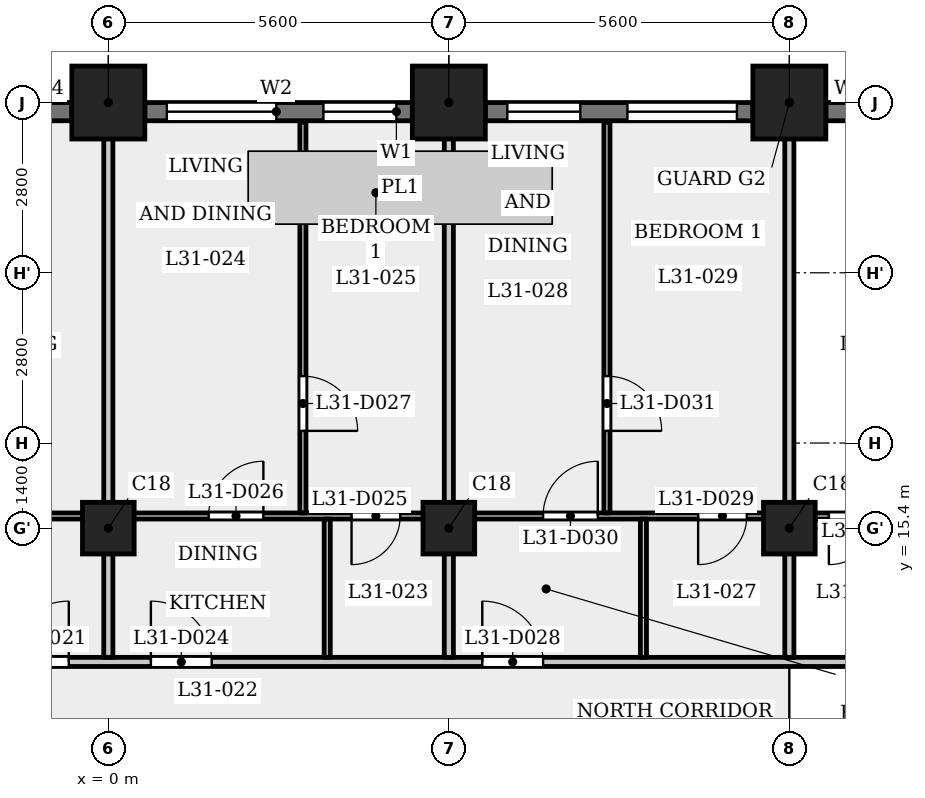
"""IFC4 building model, lengths in metres.
Left out: names, types, materials, properties, quantities, classifications, styles, units other than length and angle.
Written with IfcOpenShell. Run it as: python <this file> out.ifc"""

import sys

from ifc_helpers import new_model, si_unit, direction, frame, frame_2d, origin, origin_2d, place, context, subcontext, project, spatial, rectangle, extrude, element, fill, save


model = new_model("IFC4")
c1 = context("Model", 3, precision=1e-05, world=origin(), true_north=direction((0.0, 1.0)))
c2 = subcontext(c1, "Body", "Model", "MODEL_VIEW")
j1 = project(units=[si_unit("LENGTHUNIT", "METRE"), si_unit("PLANEANGLEUNIT", "RADIAN")], contexts=[c1])
p1 = place(None, origin())
s1 = spatial("IfcSite", under=j1, at=p1, CompositionType="ELEMENT")
p2 = place(p1, origin())
s2 = spatial("IfcBuilding", under=s1, at=p2, CompositionType="ELEMENT")
p3 = place(p2, frame((0.0, 0.0, 121.8)))
s3 = spatial("IfcBuildingStorey", under=s2, at=p3, CompositionType="ELEMENT", Elevation=121.8)
for number, where, z_axis, x_axis in (
    (1, (11.2, 22.4, 0.0), (0.0, 0.0, 1.0), (1.0, 0.0, 0.0)),
    (2, (5.6, 22.4, 0.0), (0.0, 0.0, 1.0), (1.0, 0.0, 0.0)),
    (3, (0.0, 22.4, 0.0), (0.0, 0.0, 1.0), (1.0, 0.0, 0.0)),
):
    element("IfcColumn", number, at=place(p3, frame(where, z_axis=z_axis, x_axis=x_axis)), inside=s3, PredefinedType="COLUMN", context=c2, shape_type="SweptSolid", body=[
        extrude(rectangle(XDim=1.2, YDim=1.2, at=origin_2d()), origin(), (0.0, 0.0, 1.0), 3.5),
    ])
for number, where, z_axis, x_axis in (
    (4, (0.0, 15.4, 0.0), (0.0, 0.0, 1.0), (1.0, 0.0, 0.0)),
    (5, (5.6, 15.4, 0.0), (0.0, 0.0, 1.0), (1.0, 0.0, 0.0)),
    (6, (11.2, 15.4, 0.0), (0.0, 0.0, 1.0), (1.0, 0.0, 0.0)),
):
    element("IfcColumn", number, at=place(p3, frame(where, z_axis=z_axis, x_axis=x_axis)), inside=s3, PredefinedType="COLUMN", context=c2, shape_type="SweptSolid", body=[
        extrude(rectangle(XDim=0.85, YDim=0.85, at=origin_2d()), origin(), (0.0, 0.0, 1.0), 3.5),
    ])
p4 = place(p3, frame((16.2, 22.25, 0.0), z_axis=(0.0, 0.0, 1.0), x_axis=(-1.0, 0.0, 0.0)))
e7 = element("IfcWall", 7, at=p4, inside=s3, PredefinedType="SOLIDWALL", context=c2, shape_type="SweptSolid", body=[
    extrude(rectangle(XDim=4.4, YDim=0.3, at=frame_2d((2.2, 0.0))), origin(), (0.0, 0.0, 1.0), 2.35),
])
p5 = place(p4, frame((0.4, 0.0, 1.2)))
e8 = element("IfcOpeningElement", 8, at=p5, cuts=e7, PredefinedType="OPENING", context=c2, shape_type="SweptSolid", body=[
    extrude(rectangle(XDim=3.6, YDim=0.95, at=frame_2d((1.8, 0.475))), frame((0.0, 0.16, 0.0), z_axis=(0.0, -1.0, 0.0), x_axis=(1.0, 0.0, 0.0)), (0.0, 0.0, 1.0), 0.32),
])
p6 = place(p3, frame((10.6, 22.25, 0.0), z_axis=(0.0, 0.0, 1.0), x_axis=(-1.0, 0.0, 0.0)))
e9 = element("IfcWall", 9, at=p6, inside=s3, PredefinedType="SOLIDWALL", context=c2, shape_type="SweptSolid", body=[
    extrude(rectangle(XDim=4.4, YDim=0.3, at=frame_2d((2.2, 0.0))), origin(), (0.0, 0.0, 1.0), 2.35),
])
p7 = place(p6, frame((0.262, 0.0, 0.9)))
e10 = element("IfcOpeningElement", 10, at=p7, cuts=e9, PredefinedType="OPENING", context=c2, shape_type="SweptSolid", body=[
    extrude(rectangle(XDim=1.8, YDim=1.25, at=frame_2d((0.9, 0.625))), frame((0.0, 0.16, 0.0), z_axis=(0.0, -1.0, 0.0), x_axis=(1.0, 0.0, 0.0)), (0.0, 0.0, 1.0), 0.32),
])
p8 = place(p6, frame((2.837, 0.0, 0.6)))
e11 = element("IfcOpeningElement", 11, at=p8, cuts=e9, PredefinedType="OPENING", context=c2, shape_type="SweptSolid", body=[
    extrude(rectangle(XDim=1.2, YDim=1.55, at=frame_2d((0.6, 0.775))), frame((0.0, 0.16, 0.0), z_axis=(0.0, -1.0, 0.0), x_axis=(1.0, 0.0, 0.0)), (0.0, 0.0, 1.0), 0.32),
])
p9 = place(p3, frame((5.0, 22.25, 0.0), z_axis=(0.0, 0.0, 1.0), x_axis=(-1.0, 0.0, 0.0)))
e12 = element("IfcWall", 12, at=p9, inside=s3, PredefinedType="SOLIDWALL", context=c2, shape_type="SweptSolid", body=[
    extrude(rectangle(XDim=4.4, YDim=0.3, at=frame_2d((2.2, 0.0))), origin(), (0.0, 0.0, 1.0), 2.35),
])
p10 = place(p9, frame((0.262, 0.0, 0.6)))
e13 = element("IfcOpeningElement", 13, at=p10, cuts=e12, PredefinedType="OPENING", context=c2, shape_type="SweptSolid", body=[
    extrude(rectangle(XDim=1.2, YDim=1.55, at=frame_2d((0.6, 0.775))), frame((0.0, 0.16, 0.0), z_axis=(0.0, -1.0, 0.0), x_axis=(1.0, 0.0, 0.0)), (0.0, 0.0, 1.0), 0.32),
])
p11 = place(p9, frame((2.238, 0.0, 0.9)))
e14 = element("IfcOpeningElement", 14, at=p11, cuts=e12, PredefinedType="OPENING", context=c2, shape_type="SweptSolid", body=[
    extrude(rectangle(XDim=1.8, YDim=1.25, at=frame_2d((0.9, 0.625))), frame((0.0, 0.16, 0.0), z_axis=(0.0, -1.0, 0.0), x_axis=(1.0, 0.0, 0.0)), (0.0, 0.0, 1.0), 0.32),
])
p12 = place(p3, frame((-0.6, 22.25, 0.0), z_axis=(0.0, 0.0, 1.0), x_axis=(-1.0, 0.0, 0.0)))
e15 = element("IfcWall", 15, at=p12, inside=s3, PredefinedType="SOLIDWALL", context=c2, shape_type="SweptSolid", body=[
    extrude(rectangle(XDim=4.4, YDim=0.3, at=frame_2d((2.2, 0.0))), origin(), (0.0, 0.0, 1.0), 2.35),
])
p13 = place(p12, frame((0.4, 0.0, 1.2)))
e16 = element("IfcOpeningElement", 16, at=p13, cuts=e15, PredefinedType="OPENING", context=c2, shape_type="SweptSolid", body=[
    extrude(rectangle(XDim=3.6, YDim=0.95, at=frame_2d((1.8, 0.475))), frame((0.0, 0.16, 0.0), z_axis=(0.0, -1.0, 0.0), x_axis=(1.0, 0.0, 0.0)), (0.0, 0.0, 1.0), 0.32),
])
p14 = place(p3, frame((-17.4, 13.2, 0.0), z_axis=(0.0, 0.0, 1.0), x_axis=(1.0, 0.0, 0.0)))
e17 = element("IfcWall", 17, at=p14, inside=s3, PredefinedType="PARTITIONING", context=c2, shape_type="SweptSolid", body=[
    extrude(rectangle(XDim=34.8, YDim=0.15, at=frame_2d((17.4, 0.0))), origin(), (0.0, 0.0, 1.0), 3.15),
])
p15 = place(p14, frame((0.25, 0.0, 0.0)))
e18 = element("IfcOpeningElement", 18, at=p15, cuts=e17, PredefinedType="OPENING", context=c2, shape_type="SweptSolid", body=[
    extrude(rectangle(XDim=1.0, YDim=2.1, at=frame_2d((0.5, 1.05))), frame((0.0, 0.085, 0.0), z_axis=(0.0, -1.0, 0.0), x_axis=(1.0, 0.0, 0.0)), (0.0, 0.0, 1.0), 0.17),
])
p16 = place(p14, frame((33.65, 0.0, 0.0)))
e19 = element("IfcOpeningElement", 19, at=p16, cuts=e17, PredefinedType="OPENING", context=c2, shape_type="SweptSolid", body=[
    extrude(rectangle(XDim=1.0, YDim=2.1, at=frame_2d((0.5, 1.05))), frame((0.0, 0.085, 0.0), z_axis=(0.0, -1.0, 0.0), x_axis=(1.0, 0.0, 0.0)), (0.0, 0.0, 1.0), 0.17),
])
p17 = place(p14, frame((15.75, 0.0, 0.0)))
e20 = element("IfcOpeningElement", 20, at=p17, cuts=e17, PredefinedType="OPENING", context=c2, shape_type="SweptSolid", body=[
    extrude(rectangle(XDim=1.0, YDim=2.1, at=frame_2d((0.5, 1.05))), frame((0.0, 0.085, 0.0), z_axis=(0.0, -1.0, 0.0), x_axis=(1.0, 0.0, 0.0)), (0.0, 0.0, 1.0), 0.17),
])
p18 = place(p14, frame((18.1, 0.0, 0.0)))
e21 = element("IfcOpeningElement", 21, at=p18, cuts=e17, PredefinedType="OPENING", context=c2, shape_type="SweptSolid", body=[
    extrude(rectangle(XDim=1.0, YDim=2.1, at=frame_2d((0.5, 1.05))), frame((0.0, 0.085, 0.0), z_axis=(0.0, -1.0, 0.0), x_axis=(1.0, 0.0, 0.0)), (0.0, 0.0, 1.0), 0.17),
])
p19 = place(p14, frame((23.55, 0.0, 0.0)))
e22 = element("IfcOpeningElement", 22, at=p19, cuts=e17, PredefinedType="OPENING", context=c2, shape_type="SweptSolid", body=[
    extrude(rectangle(XDim=1.0, YDim=2.1, at=frame_2d((0.5, 1.05))), frame((0.0, 0.085, 0.0), z_axis=(0.0, -1.0, 0.0), x_axis=(1.0, 0.0, 0.0)), (0.0, 0.0, 1.0), 0.17),
])
p20 = place(p3, frame((-16.725, 15.6, 0.0), z_axis=(0.0, 0.0, 1.0), x_axis=(1.0, 0.0, 0.0)))
e23 = element("IfcWall", 23, at=p20, inside=s3, PredefinedType="PARTITIONING", context=c2, shape_type="SweptSolid", body=[
    extrude(rectangle(XDim=33.45, YDim=0.1, at=frame_2d((16.725, 0.0))), origin(), (0.0, 0.0, 1.0), 3.15),
])
p21 = place(p20, frame((9.425, 0.0, 0.0)))
e24 = element("IfcOpeningElement", 24, at=p21, cuts=e23, PredefinedType="OPENING", context=c2, shape_type="SweptSolid", body=[
    extrude(rectangle(XDim=0.8, YDim=2.1, at=frame_2d((0.4, 1.05))), frame((0.0, 0.06, 0.0), z_axis=(0.0, -1.0, 0.0), x_axis=(1.0, 0.0, 0.0)), (0.0, 0.0, 1.0), 0.12),
])
p22 = place(p20, frame((6.975, 0.0, 0.0)))
e25 = element("IfcOpeningElement", 25, at=p22, cuts=e23, PredefinedType="OPENING", context=c2, shape_type="SweptSolid", body=[
    extrude(rectangle(XDim=0.9, YDim=2.1, at=frame_2d((0.45, 1.05))), frame((0.0, 0.06, 0.0), z_axis=(0.0, -1.0, 0.0), x_axis=(1.0, 0.0, 0.0)), (0.0, 0.0, 1.0), 0.12),
])
p23 = place(p20, frame((1.875, 0.0, 0.0)))
e26 = element("IfcOpeningElement", 26, at=p23, cuts=e23, PredefinedType="OPENING", context=c2, shape_type="SweptSolid", body=[
    extrude(rectangle(XDim=0.9, YDim=2.1, at=frame_2d((0.45, 1.05))), frame((0.0, 0.06, 0.0), z_axis=(0.0, -1.0, 0.0), x_axis=(1.0, 0.0, 0.0)), (0.0, 0.0, 1.0), 0.12),
])
p24 = place(p20, frame((3.475, 0.0, 0.0)))
e27 = element("IfcOpeningElement", 27, at=p24, cuts=e23, PredefinedType="OPENING", context=c2, shape_type="SweptSolid", body=[
    extrude(rectangle(XDim=0.9, YDim=2.1, at=frame_2d((0.45, 1.05))), frame((0.0, 0.06, 0.0), z_axis=(0.0, -1.0, 0.0), x_axis=(1.0, 0.0, 0.0)), (0.0, 0.0, 1.0), 0.12),
])
p25 = place(p20, frame((11.775, 0.0, 0.0)))
e28 = element("IfcOpeningElement", 28, at=p25, cuts=e23, PredefinedType="OPENING", context=c2, shape_type="SweptSolid", body=[
    extrude(rectangle(XDim=0.8, YDim=2.1, at=frame_2d((0.4, 1.05))), frame((0.0, 0.06, 0.0), z_axis=(0.0, -1.0, 0.0), x_axis=(1.0, 0.0, 0.0)), (0.0, 0.0, 1.0), 0.12),
])
p26 = place(p20, frame((14.175, 0.0, 0.0)))
e29 = element("IfcOpeningElement", 29, at=p26, cuts=e23, PredefinedType="OPENING", context=c2, shape_type="SweptSolid", body=[
    extrude(rectangle(XDim=0.9, YDim=2.1, at=frame_2d((0.45, 1.05))), frame((0.0, 0.06, 0.0), z_axis=(0.0, -1.0, 0.0), x_axis=(1.0, 0.0, 0.0)), (0.0, 0.0, 1.0), 0.12),
])
p27 = place(p20, frame((20.725, 0.0, 0.0)))
e30 = element("IfcOpeningElement", 30, at=p27, cuts=e23, PredefinedType="OPENING", context=c2, shape_type="SweptSolid", body=[
    extrude(rectangle(XDim=0.8, YDim=2.1, at=frame_2d((0.4, 1.05))), frame((0.0, 0.06, 0.0), z_axis=(0.0, -1.0, 0.0), x_axis=(1.0, 0.0, 0.0)), (0.0, 0.0, 1.0), 0.12),
])
p28 = place(p20, frame((18.375, 0.0, 0.0)))
e31 = element("IfcOpeningElement", 31, at=p28, cuts=e23, PredefinedType="OPENING", context=c2, shape_type="SweptSolid", body=[
    extrude(rectangle(XDim=0.9, YDim=2.1, at=frame_2d((0.45, 1.05))), frame((0.0, 0.06, 0.0), z_axis=(0.0, -1.0, 0.0), x_axis=(1.0, 0.0, 0.0)), (0.0, 0.0, 1.0), 0.12),
])
p29 = place(p20, frame((26.425, 0.0, 0.0)))
e32 = element("IfcOpeningElement", 32, at=p29, cuts=e23, PredefinedType="OPENING", context=c2, shape_type="SweptSolid", body=[
    extrude(rectangle(XDim=0.8, YDim=2.1, at=frame_2d((0.4, 1.05))), frame((0.0, 0.06, 0.0), z_axis=(0.0, -1.0, 0.0), x_axis=(1.0, 0.0, 0.0)), (0.0, 0.0, 1.0), 0.12),
])
p30 = place(p20, frame((23.875, 0.0, 0.0)))
e33 = element("IfcOpeningElement", 33, at=p30, cuts=e23, PredefinedType="OPENING", context=c2, shape_type="SweptSolid", body=[
    extrude(rectangle(XDim=0.9, YDim=2.1, at=frame_2d((0.45, 1.05))), frame((0.0, 0.06, 0.0), z_axis=(0.0, -1.0, 0.0), x_axis=(1.0, 0.0, 0.0)), (0.0, 0.0, 1.0), 0.12),
])
p31 = place(p20, frame((28.575, 0.0, 0.0)))
e34 = element("IfcOpeningElement", 34, at=p31, cuts=e23, PredefinedType="OPENING", context=c2, shape_type="SweptSolid", body=[
    extrude(rectangle(XDim=0.8, YDim=2.1, at=frame_2d((0.4, 1.05))), frame((0.0, 0.06, 0.0), z_axis=(0.0, -1.0, 0.0), x_axis=(1.0, 0.0, 0.0)), (0.0, 0.0, 1.0), 0.12),
])
p32 = place(p20, frame((30.725, 0.0, 0.0)))
e35 = element("IfcOpeningElement", 35, at=p32, cuts=e23, PredefinedType="OPENING", context=c2, shape_type="SweptSolid", body=[
    extrude(rectangle(XDim=0.9, YDim=2.1, at=frame_2d((0.45, 1.05))), frame((0.0, 0.06, 0.0), z_axis=(0.0, -1.0, 0.0), x_axis=(1.0, 0.0, 0.0)), (0.0, 0.0, 1.0), 0.12),
])
p33 = place(p3, frame((0.0, 13.275, 0.0), z_axis=(0.0, 0.0, 1.0), x_axis=(0.0, 1.0, 0.0)))
e36 = element("IfcWall", 36, at=p33, inside=s3, PredefinedType="PARTITIONING", context=c2, shape_type="SweptSolid", body=[
    extrude(rectangle(XDim=2.275, YDim=0.15, at=frame_2d((1.138, 0.0))), origin(), (0.0, 0.0, 1.0), 3.15),
])
p34 = place(p3, frame((0.0, 15.65, 0.0), z_axis=(0.0, 0.0, 1.0), x_axis=(0.0, 1.0, 0.0)))
e37 = element("IfcWall", 37, at=p34, inside=s3, PredefinedType="PARTITIONING", context=c2, shape_type="SweptSolid", body=[
    extrude(rectangle(XDim=7.33, YDim=0.15, at=frame_2d((3.665, 0.0))), origin(), (0.0, 0.0, 1.0), 3.15),
])
p35 = place(p3, frame((3.2, 15.65, 0.0), z_axis=(0.0, 0.0, 1.0), x_axis=(0.0, 1.0, 0.0)))
e38 = element("IfcWall", 38, at=p35, inside=s3, PredefinedType="PARTITIONING", context=c2, shape_type="SweptSolid", body=[
    extrude(rectangle(XDim=6.43, YDim=0.1, at=frame_2d((3.215, 0.0))), origin(), (0.0, 0.0, 1.0), 3.15),
])
p36 = place(p35, frame((1.35, 0.0, 0.0)))
e39 = element("IfcOpeningElement", 39, at=p36, cuts=e38, PredefinedType="OPENING", context=c2, shape_type="SweptSolid", body=[
    extrude(rectangle(XDim=0.9, YDim=2.1, at=frame_2d((0.45, 1.05))), frame((0.0, 0.06, 0.0), z_axis=(0.0, -1.0, 0.0), x_axis=(1.0, 0.0, 0.0)), (0.0, 0.0, 1.0), 0.12),
])
p37 = place(p3, frame((3.6, 13.275, 0.0), z_axis=(0.0, 0.0, 1.0), x_axis=(0.0, 1.0, 0.0)))
e40 = element("IfcWall", 40, at=p37, inside=s3, PredefinedType="PARTITIONING", context=c2, shape_type="SweptSolid", body=[
    extrude(rectangle(XDim=2.275, YDim=0.1, at=frame_2d((1.138, 0.0))), origin(), (0.0, 0.0, 1.0), 3.15),
])
p38 = place(p3, frame((5.6, 13.275, 0.0), z_axis=(0.0, 0.0, 1.0), x_axis=(0.0, 1.0, 0.0)))
e41 = element("IfcWall", 41, at=p38, inside=s3, PredefinedType="PARTITIONING", context=c2, shape_type="SweptSolid", body=[
    extrude(rectangle(XDim=2.275, YDim=0.15, at=frame_2d((1.138, 0.0))), origin(), (0.0, 0.0, 1.0), 3.15),
])
p39 = place(p3, frame((5.6, 15.65, 0.0), z_axis=(0.0, 0.0, 1.0), x_axis=(0.0, 1.0, 0.0)))
e42 = element("IfcWall", 42, at=p39, inside=s3, PredefinedType="PARTITIONING", context=c2, shape_type="SweptSolid", body=[
    extrude(rectangle(XDim=7.33, YDim=0.15, at=frame_2d((3.665, 0.0))), origin(), (0.0, 0.0, 1.0), 3.15),
])
p40 = place(p3, frame((8.2, 15.65, 0.0), z_axis=(0.0, 0.0, 1.0), x_axis=(0.0, 1.0, 0.0)))
e43 = element("IfcWall", 43, at=p40, inside=s3, PredefinedType="PARTITIONING", context=c2, shape_type="SweptSolid", body=[
    extrude(rectangle(XDim=6.43, YDim=0.1, at=frame_2d((3.215, 0.0))), origin(), (0.0, 0.0, 1.0), 3.15),
])
p41 = place(p40, frame((1.35, 0.0, 0.0)))
e44 = element("IfcOpeningElement", 44, at=p41, cuts=e43, PredefinedType="OPENING", context=c2, shape_type="SweptSolid", body=[
    extrude(rectangle(XDim=0.9, YDim=2.1, at=frame_2d((0.45, 1.05))), frame((0.0, 0.06, 0.0), z_axis=(0.0, -1.0, 0.0), x_axis=(1.0, 0.0, 0.0)), (0.0, 0.0, 1.0), 0.12),
])
p42 = place(p3, frame((8.8, 13.275, 0.0), z_axis=(0.0, 0.0, 1.0), x_axis=(0.0, 1.0, 0.0)))
e45 = element("IfcWall", 45, at=p42, inside=s3, PredefinedType="PARTITIONING", context=c2, shape_type="SweptSolid", body=[
    extrude(rectangle(XDim=2.275, YDim=0.1, at=frame_2d((1.138, 0.0))), origin(), (0.0, 0.0, 1.0), 3.15),
])
p43 = place(p3, frame((11.2, 13.275, 0.0), z_axis=(0.0, 0.0, 1.0), x_axis=(0.0, 1.0, 0.0)))
e46 = element("IfcWall", 46, at=p43, inside=s3, PredefinedType="PARTITIONING", context=c2, shape_type="SweptSolid", body=[
    extrude(rectangle(XDim=2.275, YDim=0.15, at=frame_2d((1.138, 0.0))), origin(), (0.0, 0.0, 1.0), 3.15),
])
p44 = place(p3, frame((11.2, 15.65, 0.0), z_axis=(0.0, 0.0, 1.0), x_axis=(0.0, 1.0, 0.0)))
e47 = element("IfcWall", 47, at=p44, inside=s3, PredefinedType="PARTITIONING", context=c2, shape_type="SweptSolid", body=[
    extrude(rectangle(XDim=7.33, YDim=0.15, at=frame_2d((3.665, 0.0))), origin(), (0.0, 0.0, 1.0), 3.15),
])
p45 = place(p17, origin())
e48 = element("IfcDoor", 48, at=p45, inside=s3, OperationType="SINGLE_SWING_LEFT", PredefinedType="DOOR", context=c2, shape_type="SweptSolid", body=[
    extrude(rectangle(XDim=1.0, YDim=2.1, at=frame_2d((0.5, 1.05))), frame((0.0, 0.025, 0.0), z_axis=(0.0, -1.0, 0.0), x_axis=(1.0, 0.0, 0.0)), (0.0, 0.0, 1.0), 0.05),
])
fill(e20, e48)
p46 = place(p18, origin())
e49 = element("IfcDoor", 49, at=p46, inside=s3, OperationType="SINGLE_SWING_RIGHT", PredefinedType="DOOR", context=c2, shape_type="SweptSolid", body=[
    extrude(rectangle(XDim=1.0, YDim=2.1, at=frame_2d((0.5, 1.05))), frame((0.0, 0.025, 0.0), z_axis=(0.0, -1.0, 0.0), x_axis=(1.0, 0.0, 0.0)), (0.0, 0.0, 1.0), 0.05),
])
fill(e21, e49)
p47 = place(p27, origin())
e50 = element("IfcDoor", 50, at=p47, inside=s3, OperationType="SINGLE_SWING_LEFT", PredefinedType="DOOR", context=c2, shape_type="SweptSolid", body=[
    extrude(rectangle(XDim=0.8, YDim=2.1, at=frame_2d((0.4, 1.05))), frame((0.0, 0.025, 0.0), z_axis=(0.0, -1.0, 0.0), x_axis=(1.0, 0.0, 0.0)), (0.0, 0.0, 1.0), 0.05),
])
fill(e30, e50)
p48 = place(p28, origin())
e51 = element("IfcDoor", 51, at=p48, inside=s3, OperationType="SINGLE_SWING_LEFT", PredefinedType="DOOR", context=c2, shape_type="SweptSolid", body=[
    extrude(rectangle(XDim=0.9, YDim=2.1, at=frame_2d((0.45, 1.05))), frame((0.0, 0.025, 0.0), z_axis=(0.0, -1.0, 0.0), x_axis=(1.0, 0.0, 0.0)), (0.0, 0.0, 1.0), 0.05),
])
fill(e31, e51)
p49 = place(p36, origin())
e52 = element("IfcDoor", 52, at=p49, inside=s3, OperationType="SINGLE_SWING_LEFT", PredefinedType="DOOR", context=c2, shape_type="SweptSolid", body=[
    extrude(rectangle(XDim=0.9, YDim=2.1, at=frame_2d((0.45, 1.05))), frame((0.0, 0.025, 0.0), z_axis=(0.0, -1.0, 0.0), x_axis=(1.0, 0.0, 0.0)), (0.0, 0.0, 1.0), 0.05),
])
fill(e39, e52)
p50 = place(p19, origin())
e53 = element("IfcDoor", 53, at=p50, inside=s3, OperationType="SINGLE_SWING_RIGHT", PredefinedType="DOOR", context=c2, shape_type="SweptSolid", body=[
    extrude(rectangle(XDim=1.0, YDim=2.1, at=frame_2d((0.5, 1.05))), frame((0.0, 0.025, 0.0), z_axis=(0.0, -1.0, 0.0), x_axis=(1.0, 0.0, 0.0)), (0.0, 0.0, 1.0), 0.05),
])
fill(e22, e53)
p51 = place(p29, origin())
e54 = element("IfcDoor", 54, at=p51, inside=s3, OperationType="SINGLE_SWING_LEFT", PredefinedType="DOOR", context=c2, shape_type="SweptSolid", body=[
    extrude(rectangle(XDim=0.8, YDim=2.1, at=frame_2d((0.4, 1.05))), frame((0.0, 0.025, 0.0), z_axis=(0.0, -1.0, 0.0), x_axis=(1.0, 0.0, 0.0)), (0.0, 0.0, 1.0), 0.05),
])
fill(e32, e54)
p52 = place(p30, origin())
e55 = element("IfcDoor", 55, at=p52, inside=s3, OperationType="SINGLE_SWING_LEFT", PredefinedType="DOOR", context=c2, shape_type="SweptSolid", body=[
    extrude(rectangle(XDim=0.9, YDim=2.1, at=frame_2d((0.45, 1.05))), frame((0.0, 0.025, 0.0), z_axis=(0.0, -1.0, 0.0), x_axis=(1.0, 0.0, 0.0)), (0.0, 0.0, 1.0), 0.05),
])
fill(e33, e55)
p53 = place(p41, origin())
e56 = element("IfcDoor", 56, at=p53, inside=s3, OperationType="SINGLE_SWING_LEFT", PredefinedType="DOOR", context=c2, shape_type="SweptSolid", body=[
    extrude(rectangle(XDim=0.9, YDim=2.1, at=frame_2d((0.45, 1.05))), frame((0.0, 0.025, 0.0), z_axis=(0.0, -1.0, 0.0), x_axis=(1.0, 0.0, 0.0)), (0.0, 0.0, 1.0), 0.05),
])
fill(e44, e56)
p54 = place(p31, origin())
e57 = element("IfcDoor", 57, at=p54, inside=s3, OperationType="SINGLE_SWING_LEFT", PredefinedType="DOOR", context=c2, shape_type="SweptSolid", body=[
    extrude(rectangle(XDim=0.8, YDim=2.1, at=frame_2d((0.4, 1.05))), frame((0.0, 0.025, 0.0), z_axis=(0.0, -1.0, 0.0), x_axis=(1.0, 0.0, 0.0)), (0.0, 0.0, 1.0), 0.05),
])
fill(e34, e57)
p55 = place(p7, origin())
e58 = element("IfcWindow", 58, at=p55, inside=s3, PartitioningType="SINGLE_PANEL", PredefinedType="WINDOW", context=c2, shape_type="SweptSolid", body=[
    extrude(rectangle(XDim=1.8, YDim=1.25, at=frame_2d((0.9, 0.625))), frame((0.0, 0.03, 0.0), z_axis=(0.0, -1.0, 0.0), x_axis=(1.0, 0.0, 0.0)), (0.0, 0.0, 1.0), 0.06),
])
fill(e10, e58)
p56 = place(p8, origin())
e59 = element("IfcWindow", 59, at=p56, inside=s3, PartitioningType="SINGLE_PANEL", PredefinedType="WINDOW", context=c2, shape_type="SweptSolid", body=[
    extrude(rectangle(XDim=1.2, YDim=1.55, at=frame_2d((0.6, 0.775))), frame((0.0, 0.03, 0.0), z_axis=(0.0, -1.0, 0.0), x_axis=(1.0, 0.0, 0.0)), (0.0, 0.0, 1.0), 0.06),
])
fill(e11, e59)
p57 = place(p10, origin())
e60 = element("IfcWindow", 60, at=p57, inside=s3, PartitioningType="SINGLE_PANEL", PredefinedType="WINDOW", context=c2, shape_type="SweptSolid", body=[
    extrude(rectangle(XDim=1.2, YDim=1.55, at=frame_2d((0.6, 0.775))), frame((0.0, 0.03, 0.0), z_axis=(0.0, -1.0, 0.0), x_axis=(1.0, 0.0, 0.0)), (0.0, 0.0, 1.0), 0.06),
])
fill(e13, e60)
p58 = place(p11, origin())
e61 = element("IfcWindow", 61, at=p58, inside=s3, PartitioningType="SINGLE_PANEL", PredefinedType="WINDOW", context=c2, shape_type="SweptSolid", body=[
    extrude(rectangle(XDim=1.8, YDim=1.25, at=frame_2d((0.9, 0.625))), frame((0.0, 0.03, 0.0), z_axis=(0.0, -1.0, 0.0), x_axis=(1.0, 0.0, 0.0)), (0.0, 0.0, 1.0), 0.06),
])
fill(e14, e61)
save(model, sys.argv[1])
